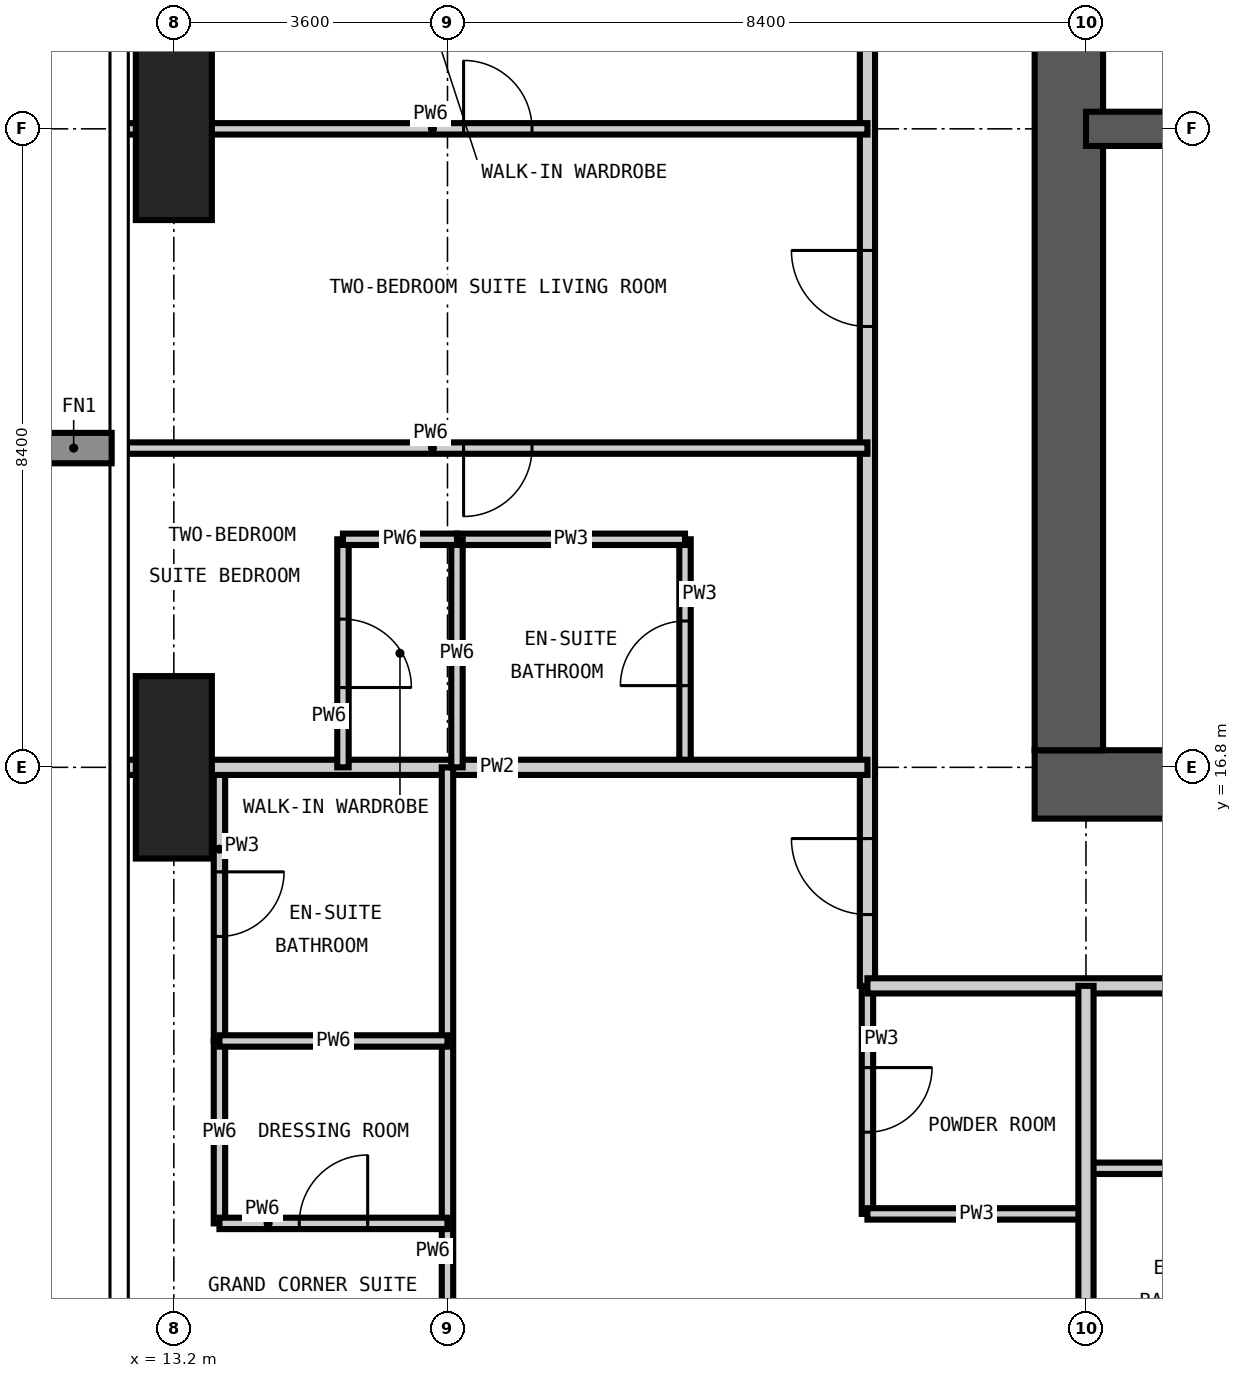
"""IFC4 building model, lengths in metres.
Left out: names, types, materials, properties, quantities, classifications, styles, units other than length and angle.
Written with IfcOpenShell. Run it as: python <this file> out.ifc"""

import sys

from ifc_helpers import new_model, si_unit, direction, frame, frame_2d, origin, origin_2d, place, context, subcontext, project, spatial, rectangle, extrude, element, fill, save


model = new_model("IFC4")
c1 = context("Model", 3, precision=1e-05, world=origin(), true_north=direction((0.0, 1.0)))
c2 = subcontext(c1, "Body", "Model", "MODEL_VIEW")
j1 = project(units=[si_unit("LENGTHUNIT", "METRE"), si_unit("PLANEANGLEUNIT", "RADIAN")], contexts=[c1])
p1 = place(None, origin())
s1 = spatial("IfcSite", under=j1, at=p1, CompositionType="ELEMENT")
p2 = place(p1, origin())
s2 = spatial("IfcBuilding", under=s1, at=p2, CompositionType="ELEMENT")
p3 = place(p2, frame((0.0, 0.0, 237.3)))
s3 = spatial("IfcBuildingStorey", under=s2, at=p3, CompositionType="ELEMENT", Elevation=237.3)
for number, where, z_axis, x_axis in (
    (1, (13.2, 16.8, -0.35), (0.0, 0.0, 1.0), (1.0, 0.0, 0.0)),
    (2, (13.2, 25.2, -0.35), (0.0, 0.0, 1.0), (1.0, 0.0, 0.0)),
):
    element("IfcColumn", number, at=place(p3, frame(where, z_axis=z_axis, x_axis=x_axis)), inside=s3, PredefinedType="COLUMN", context=c2, shape_type="SweptSolid", body=[
        extrude(rectangle(XDim=1.0, YDim=2.4, at=origin_2d()), origin(), (0.0, 0.0, 1.0), 3.9),
    ])
p4 = place(p3, frame((24.525, 16.575, -0.35), z_axis=(0.0, 0.0, 1.0), x_axis=(1.0, 0.0, 0.0)))
e3 = element("IfcWall", 3, at=p4, inside=s3, PredefinedType="SHEAR", context=c2, shape_type="SweptSolid", body=[
    extrude(rectangle(XDim=18.15, YDim=0.9, at=frame_2d((9.075, 0.0))), origin(), (0.0, 0.0, 1.0), 3.9),
])
p5 = place(p4, frame((4.375, 0.0, 0.35)))
e4 = element("IfcOpeningElement", 4, at=p5, cuts=e3, PredefinedType="OPENING", context=c2, shape_type="SweptSolid", body=[
    extrude(rectangle(XDim=1.0, YDim=2.1, at=frame_2d((0.5, 1.05))), frame((0.0, 0.46, 0.0), z_axis=(0.0, -1.0, 0.0), x_axis=(1.0, 0.0, 0.0)), (0.0, 0.0, 1.0), 0.92),
])
p6 = place(p4, frame((10.675, 0.0, 0.35)))
e5 = element("IfcOpeningElement", 5, at=p6, cuts=e3, PredefinedType="OPENING", context=c2, shape_type="SweptSolid", body=[
    extrude(rectangle(XDim=1.0, YDim=2.1, at=frame_2d((0.5, 1.05))), frame((0.0, 0.46, 0.0), z_axis=(0.0, -1.0, 0.0), x_axis=(1.0, 0.0, 0.0)), (0.0, 0.0, 1.0), 0.92),
])
p7 = place(p3, frame((24.975, 41.775, -0.35), z_axis=(0.0, 0.0, 1.0), x_axis=(0.0, -1.0, 0.0)))
e6 = element("IfcWall", 6, at=p7, inside=s3, PredefinedType="SHEAR", context=c2, shape_type="SweptSolid", body=[
    extrude(rectangle(XDim=24.75, YDim=0.9, at=frame_2d((12.375, 0.0))), origin(), (0.0, 0.0, 1.0), 3.9),
])
p8 = place(p7, frame((11.875, 0.0, 0.35)))
e7 = element("IfcOpeningElement", 7, at=p8, cuts=e6, PredefinedType="OPENING", context=c2, shape_type="SweptSolid", body=[
    extrude(rectangle(XDim=1.0, YDim=2.1, at=frame_2d((0.5, 1.05))), frame((0.0, 0.46, 0.0), z_axis=(0.0, -1.0, 0.0), x_axis=(1.0, 0.0, 0.0)), (0.0, 0.0, 1.0), 0.92),
])
p9 = place(p3, frame((25.2, 25.2, -0.35), z_axis=(0.0, 0.0, 1.0), x_axis=(1.0, 0.0, 0.0)))
e8 = element("IfcWall", 8, at=p9, inside=s3, PredefinedType="SHEAR", context=c2, shape_type="SweptSolid", body=[
    extrude(rectangle(XDim=16.8, YDim=0.45, at=frame_2d((8.4, 0.0))), origin(), (0.0, 0.0, 1.0), 3.9),
])
p10 = place(p3, frame((13.8, 13.2, 0.0), z_axis=(0.0, 0.0, 1.0), x_axis=(0.0, 1.0, 0.0)))
e9 = element("IfcWall", 9, at=p10, inside=s3, PredefinedType="PARTITIONING", context=c2, shape_type="SweptSolid", body=[
    extrude(rectangle(XDim=3.6, YDim=0.15, at=frame_2d((1.8, 0.0))), origin(), (0.0, 0.0, 1.0), 3.55),
])
p11 = place(p10, frame((1.375, 0.0, 0.0)))
e10 = element("IfcOpeningElement", 10, at=p11, cuts=e9, PredefinedType="OPENING", context=c2, shape_type="SweptSolid", body=[
    extrude(rectangle(XDim=0.85, YDim=2.1, at=frame_2d((0.425, 1.05))), frame((0.0, 0.085, 0.0), z_axis=(0.0, -1.0, 0.0), x_axis=(1.0, 0.0, 0.0)), (0.0, 0.0, 1.0), 0.17),
])
p12 = place(p3, frame((19.925, 16.8, 0.0), z_axis=(0.0, 0.0, 1.0), x_axis=(0.0, 1.0, 0.0)))
e11 = element("IfcWall", 11, at=p12, inside=s3, PredefinedType="PARTITIONING", context=c2, shape_type="SweptSolid", body=[
    extrude(rectangle(XDim=3.0, YDim=0.15, at=frame_2d((1.5, 0.0))), origin(), (0.0, 0.0, 1.0), 3.55),
])
p13 = place(p12, frame((1.075, 0.0, 0.0)))
e12 = element("IfcOpeningElement", 12, at=p13, cuts=e11, PredefinedType="OPENING", context=c2, shape_type="SweptSolid", body=[
    extrude(rectangle(XDim=0.85, YDim=2.1, at=frame_2d((0.425, 1.05))), frame((0.0, 0.085, 0.0), z_axis=(0.0, -1.0, 0.0), x_axis=(1.0, 0.0, 0.0)), (0.0, 0.0, 1.0), 0.17),
])
p14 = place(p3, frame((22.325, 10.925, 0.0), z_axis=(0.0, 0.0, 1.0), x_axis=(0.0, 1.0, 0.0)))
e13 = element("IfcWall", 13, at=p14, inside=s3, PredefinedType="PARTITIONING", context=c2, shape_type="SweptSolid", body=[
    extrude(rectangle(XDim=3.0, YDim=0.15, at=frame_2d((1.5, 0.0))), origin(), (0.0, 0.0, 1.0), 3.55),
])
p15 = place(p14, frame((1.075, 0.0, 0.0)))
e14 = element("IfcOpeningElement", 14, at=p15, cuts=e13, PredefinedType="OPENING", context=c2, shape_type="SweptSolid", body=[
    extrude(rectangle(XDim=0.85, YDim=2.1, at=frame_2d((0.425, 1.05))), frame((0.0, 0.085, 0.0), z_axis=(0.0, -1.0, 0.0), x_axis=(1.0, 0.0, 0.0)), (0.0, 0.0, 1.0), 0.17),
])
p16 = place(p3, frame((22.325, 10.925, 0.0), z_axis=(0.0, 0.0, 1.0), x_axis=(1.0, 0.0, 0.0)))
e15 = element("IfcWall", 15, at=p16, inside=s3, PredefinedType="PARTITIONING", context=c2, shape_type="SweptSolid", body=[
    extrude(rectangle(XDim=2.875, YDim=0.15, at=frame_2d((1.438, 0.0))), origin(), (0.0, 0.0, 1.0), 3.55),
])
for number, where, z_axis, x_axis in (
    (16, (25.2, 11.525, 0.0), (0.0, 0.0, 1.0), (1.0, 0.0, 0.0)),
    (17, (16.925, 19.8, 0.0), (0.0, 0.0, 1.0), (1.0, 0.0, 0.0)),
):
    element("IfcWall", number, at=place(p3, frame(where, z_axis=z_axis, x_axis=x_axis)), inside=s3, PredefinedType="PARTITIONING", context=c2, shape_type="SweptSolid", body=[
        extrude(rectangle(XDim=3.0, YDim=0.15, at=frame_2d((1.5, 0.0))), origin(), (0.0, 0.0, 1.0), 3.55),
    ])
p17 = place(p3, frame((22.325, 13.925, 0.0), z_axis=(0.0, 0.0, 1.0), x_axis=(0.0, 1.0, 0.0)))
e18 = element("IfcWall", 18, at=p17, inside=s3, PredefinedType="PARTITIONING", context=c2, shape_type="SweptSolid", body=[
    extrude(rectangle(XDim=30.65, YDim=0.2, at=frame_2d((15.325, 0.0))), origin(), (0.0, 0.0, 1.0), 3.55),
])
p18 = place(p17, frame((8.675, 0.0, 0.0)))
e19 = element("IfcOpeningElement", 19, at=p18, cuts=e18, PredefinedType="OPENING", context=c2, shape_type="SweptSolid", body=[
    extrude(rectangle(XDim=1.0, YDim=2.2, at=frame_2d((0.5, 1.1))), frame((0.0, 0.11, 0.0), z_axis=(0.0, -1.0, 0.0), x_axis=(1.0, 0.0, 0.0)), (0.0, 0.0, 1.0), 0.22),
])
p19 = place(p17, frame((21.275, 0.0, 0.0)))
e20 = element("IfcOpeningElement", 20, at=p19, cuts=e18, PredefinedType="OPENING", context=c2, shape_type="SweptSolid", body=[
    extrude(rectangle(XDim=1.0, YDim=2.2, at=frame_2d((0.5, 1.1))), frame((0.0, 0.11, 0.0), z_axis=(0.0, -1.0, 0.0), x_axis=(1.0, 0.0, 0.0)), (0.0, 0.0, 1.0), 0.22),
])
p20 = place(p17, frame((0.938, 0.0, 0.0)))
e21 = element("IfcOpeningElement", 21, at=p20, cuts=e18, PredefinedType="OPENING", context=c2, shape_type="SweptSolid", body=[
    extrude(rectangle(XDim=1.0, YDim=2.2, at=frame_2d((0.5, 1.1))), frame((0.0, 0.11, 0.0), z_axis=(0.0, -1.0, 0.0), x_axis=(1.0, 0.0, 0.0)), (0.0, 0.0, 1.0), 0.22),
])
p21 = place(p17, frame((28.863, 0.0, 0.0)))
e22 = element("IfcOpeningElement", 22, at=p21, cuts=e18, PredefinedType="OPENING", context=c2, shape_type="SweptSolid", body=[
    extrude(rectangle(XDim=1.0, YDim=2.2, at=frame_2d((0.5, 1.1))), frame((0.0, 0.11, 0.0), z_axis=(0.0, -1.0, 0.0), x_axis=(1.0, 0.0, 0.0)), (0.0, 0.0, 1.0), 0.22),
])
p22 = place(p3, frame((45.175, 13.925, 0.0), z_axis=(0.0, 0.0, 1.0), x_axis=(-1.0, 0.0, 0.0)))
e23 = element("IfcWall", 23, at=p22, inside=s3, PredefinedType="PARTITIONING", context=c2, shape_type="SweptSolid", body=[
    extrude(rectangle(XDim=22.85, YDim=0.2, at=frame_2d((11.425, 0.0))), origin(), (0.0, 0.0, 1.0), 3.55),
])
p23 = place(p22, frame((15.275, 0.0, 0.0)))
e24 = element("IfcOpeningElement", 24, at=p23, cuts=e23, PredefinedType="OPENING", context=c2, shape_type="SweptSolid", body=[
    extrude(rectangle(XDim=1.0, YDim=2.2, at=frame_2d((0.5, 1.1))), frame((0.0, 0.11, 0.0), z_axis=(0.0, -1.0, 0.0), x_axis=(1.0, 0.0, 0.0)), (0.0, 0.0, 1.0), 0.22),
])
p24 = place(p22, frame((6.875, 0.0, 0.0)))
e25 = element("IfcOpeningElement", 25, at=p24, cuts=e23, PredefinedType="OPENING", context=c2, shape_type="SweptSolid", body=[
    extrude(rectangle(XDim=1.0, YDim=2.2, at=frame_2d((0.5, 1.1))), frame((0.0, 0.11, 0.0), z_axis=(0.0, -1.0, 0.0), x_axis=(1.0, 0.0, 0.0)), (0.0, 0.0, 1.0), 0.22),
])
p25 = place(p3, frame((25.2, 4.182, 0.0), z_axis=(0.0, 0.0, 1.0), x_axis=(0.0, 1.0, 0.0)))
e26 = element("IfcWall", 26, at=p25, inside=s3, PredefinedType="PARTITIONING", context=c2, shape_type="SweptSolid", body=[
    extrude(rectangle(XDim=9.743, YDim=0.2, at=frame_2d((4.872, 0.0))), origin(), (0.0, 0.0, 1.0), 3.55),
])
p26 = place(p3, frame((12.582, 16.8, 0.0), z_axis=(0.0, 0.0, 1.0), x_axis=(1.0, 0.0, 0.0)))
e27 = element("IfcWall", 27, at=p26, inside=s3, PredefinedType="PARTITIONING", context=c2, shape_type="SweptSolid", body=[
    extrude(rectangle(XDim=9.743, YDim=0.2, at=frame_2d((4.872, 0.0))), origin(), (0.0, 0.0, 1.0), 3.55),
])
p27 = place(p3, frame((13.8, 10.8, 0.0), z_axis=(0.0, 0.0, 1.0), x_axis=(0.0, 1.0, 0.0)))
e28 = element("IfcWall", 28, at=p27, inside=s3, PredefinedType="PARTITIONING", context=c2, shape_type="SweptSolid", body=[
    extrude(rectangle(XDim=2.4, YDim=0.15, at=frame_2d((1.2, 0.0))), origin(), (0.0, 0.0, 1.0), 3.55),
])
p28 = place(p3, frame((15.425, 16.8, 0.0), z_axis=(0.0, 0.0, 1.0), x_axis=(0.0, 1.0, 0.0)))
e29 = element("IfcWall", 29, at=p28, inside=s3, PredefinedType="PARTITIONING", context=c2, shape_type="SweptSolid", body=[
    extrude(rectangle(XDim=3.0, YDim=0.15, at=frame_2d((1.5, 0.0))), origin(), (0.0, 0.0, 1.0), 3.55),
])
p29 = place(p28, frame((1.05, 0.0, 0.0)))
e30 = element("IfcOpeningElement", 30, at=p29, cuts=e29, PredefinedType="OPENING", context=c2, shape_type="SweptSolid", body=[
    extrude(rectangle(XDim=0.9, YDim=2.1, at=frame_2d((0.45, 1.05))), frame((0.0, 0.085, 0.0), z_axis=(0.0, -1.0, 0.0), x_axis=(1.0, 0.0, 0.0)), (0.0, 0.0, 1.0), 0.17),
])
p30 = place(p3, frame((16.8, 4.182, 0.0), z_axis=(0.0, 0.0, 1.0), x_axis=(0.0, 1.0, 0.0)))
e31 = element("IfcWall", 31, at=p30, inside=s3, PredefinedType="PARTITIONING", context=c2, shape_type="SweptSolid", body=[
    extrude(rectangle(XDim=12.618, YDim=0.15, at=frame_2d((6.309, 0.0))), origin(), (0.0, 0.0, 1.0), 3.55),
])
p31 = place(p30, frame((2.868, 0.0, 0.0)))
e32 = element("IfcOpeningElement", 32, at=p31, cuts=e31, PredefinedType="OPENING", context=c2, shape_type="SweptSolid", body=[
    extrude(rectangle(XDim=0.9, YDim=2.1, at=frame_2d((0.45, 1.05))), frame((0.0, 0.085, 0.0), z_axis=(0.0, -1.0, 0.0), x_axis=(1.0, 0.0, 0.0)), (0.0, 0.0, 1.0), 0.17),
])
p32 = place(p3, frame((16.925, 16.8, 0.0), z_axis=(0.0, 0.0, 1.0), x_axis=(0.0, 1.0, 0.0)))
e33 = element("IfcWall", 33, at=p32, inside=s3, PredefinedType="PARTITIONING", context=c2, shape_type="SweptSolid", body=[
    extrude(rectangle(XDim=3.0, YDim=0.15, at=frame_2d((1.5, 0.0))), origin(), (0.0, 0.0, 1.0), 3.55),
])
p33 = place(p3, frame((13.8, 10.8, 0.0), z_axis=(0.0, 0.0, 1.0), x_axis=(1.0, 0.0, 0.0)))
e34 = element("IfcWall", 34, at=p33, inside=s3, PredefinedType="PARTITIONING", context=c2, shape_type="SweptSolid", body=[
    extrude(rectangle(XDim=3.0, YDim=0.15, at=frame_2d((1.5, 0.0))), origin(), (0.0, 0.0, 1.0), 3.55),
])
p34 = place(p33, frame((1.05, 0.0, 0.0)))
e35 = element("IfcOpeningElement", 35, at=p34, cuts=e34, PredefinedType="OPENING", context=c2, shape_type="SweptSolid", body=[
    extrude(rectangle(XDim=0.9, YDim=2.1, at=frame_2d((0.45, 1.05))), frame((0.0, 0.085, 0.0), z_axis=(0.0, -1.0, 0.0), x_axis=(1.0, 0.0, 0.0)), (0.0, 0.0, 1.0), 0.17),
])
p35 = place(p3, frame((13.8, 13.2, 0.0), z_axis=(0.0, 0.0, 1.0), x_axis=(1.0, 0.0, 0.0)))
e36 = element("IfcWall", 36, at=p35, inside=s3, PredefinedType="PARTITIONING", context=c2, shape_type="SweptSolid", body=[
    extrude(rectangle(XDim=3.0, YDim=0.15, at=frame_2d((1.5, 0.0))), origin(), (0.0, 0.0, 1.0), 3.55),
])
p36 = place(p3, frame((15.425, 19.8, 0.0), z_axis=(0.0, 0.0, 1.0), x_axis=(1.0, 0.0, 0.0)))
e37 = element("IfcWall", 37, at=p36, inside=s3, PredefinedType="PARTITIONING", context=c2, shape_type="SweptSolid", body=[
    extrude(rectangle(XDim=1.5, YDim=0.15, at=frame_2d((0.75, 0.0))), origin(), (0.0, 0.0, 1.0), 3.55),
])
p37 = place(p3, frame((12.582, 21.0, 0.0), z_axis=(0.0, 0.0, 1.0), x_axis=(1.0, 0.0, 0.0)))
e38 = element("IfcWall", 38, at=p37, inside=s3, PredefinedType="PARTITIONING", context=c2, shape_type="SweptSolid", body=[
    extrude(rectangle(XDim=9.743, YDim=0.15, at=frame_2d((4.872, 0.0))), origin(), (0.0, 0.0, 1.0), 3.55),
])
p38 = place(p37, frame((4.43, 0.0, 0.0)))
e39 = element("IfcOpeningElement", 39, at=p38, cuts=e38, PredefinedType="OPENING", context=c2, shape_type="SweptSolid", body=[
    extrude(rectangle(XDim=0.9, YDim=2.1, at=frame_2d((0.45, 1.05))), frame((0.0, 0.085, 0.0), z_axis=(0.0, -1.0, 0.0), x_axis=(1.0, 0.0, 0.0)), (0.0, 0.0, 1.0), 0.17),
])
p39 = place(p3, frame((12.582, 25.2, 0.0), z_axis=(0.0, 0.0, 1.0), x_axis=(1.0, 0.0, 0.0)))
e40 = element("IfcWall", 40, at=p39, inside=s3, PredefinedType="PARTITIONING", context=c2, shape_type="SweptSolid", body=[
    extrude(rectangle(XDim=9.743, YDim=0.15, at=frame_2d((4.872, 0.0))), origin(), (0.0, 0.0, 1.0), 3.55),
])
p40 = place(p39, frame((4.43, 0.0, 0.0)))
e41 = element("IfcOpeningElement", 41, at=p40, cuts=e40, PredefinedType="OPENING", context=c2, shape_type="SweptSolid", body=[
    extrude(rectangle(XDim=0.9, YDim=2.1, at=frame_2d((0.45, 1.05))), frame((0.0, 0.085, 0.0), z_axis=(0.0, -1.0, 0.0), x_axis=(1.0, 0.0, 0.0)), (0.0, 0.0, 1.0), 0.17),
])
p41 = place(p18, origin())
e42 = element("IfcDoor", 42, at=p41, inside=s3, OperationType="SINGLE_SWING_RIGHT", PredefinedType="DOOR", context=c2, shape_type="SweptSolid", body=[
    extrude(rectangle(XDim=1.0, YDim=2.2, at=frame_2d((0.5, 1.1))), frame((0.0, 0.025, 0.0), z_axis=(0.0, -1.0, 0.0), x_axis=(1.0, 0.0, 0.0)), (0.0, 0.0, 1.0), 0.05),
])
fill(e19, e42)
p42 = place(p38, frame((0.9, 0.0, 0.0), z_axis=(0.0, 0.0, 1.0), x_axis=(-1.0, 0.0, 0.0)))
e43 = element("IfcDoor", 43, at=p42, inside=s3, OperationType="SINGLE_SWING_RIGHT", PredefinedType="DOOR", context=c2, shape_type="SweptSolid", body=[
    extrude(rectangle(XDim=0.9, YDim=2.1, at=frame_2d((0.45, 1.05))), frame((0.0, 0.025, 0.0), z_axis=(0.0, -1.0, 0.0), x_axis=(1.0, 0.0, 0.0)), (0.0, 0.0, 1.0), 0.05),
])
fill(e39, e43)
p43 = place(p13, origin())
e44 = element("IfcDoor", 44, at=p43, inside=s3, OperationType="SINGLE_SWING_LEFT", PredefinedType="DOOR", context=c2, shape_type="SweptSolid", body=[
    extrude(rectangle(XDim=0.85, YDim=2.1, at=frame_2d((0.425, 1.05))), frame((0.0, 0.025, 0.0), z_axis=(0.0, -1.0, 0.0), x_axis=(1.0, 0.0, 0.0)), (0.0, 0.0, 1.0), 0.05),
])
fill(e12, e44)
p44 = place(p29, frame((0.9, 0.0, 0.0), z_axis=(0.0, 0.0, 1.0), x_axis=(-1.0, 0.0, 0.0)))
e45 = element("IfcDoor", 45, at=p44, inside=s3, OperationType="SINGLE_SWING_RIGHT", PredefinedType="DOOR", context=c2, shape_type="SweptSolid", body=[
    extrude(rectangle(XDim=0.9, YDim=2.1, at=frame_2d((0.45, 1.05))), frame((0.0, 0.025, 0.0), z_axis=(0.0, -1.0, 0.0), x_axis=(1.0, 0.0, 0.0)), (0.0, 0.0, 1.0), 0.05),
])
fill(e30, e45)
p45 = place(p40, origin())
e46 = element("IfcDoor", 46, at=p45, inside=s3, OperationType="SINGLE_SWING_LEFT", PredefinedType="DOOR", context=c2, shape_type="SweptSolid", body=[
    extrude(rectangle(XDim=0.9, YDim=2.1, at=frame_2d((0.45, 1.05))), frame((0.0, 0.025, 0.0), z_axis=(0.0, -1.0, 0.0), x_axis=(1.0, 0.0, 0.0)), (0.0, 0.0, 1.0), 0.05),
])
fill(e41, e46)
p46 = place(p20, origin())
e47 = element("IfcDoor", 47, at=p46, inside=s3, OperationType="SINGLE_SWING_RIGHT", PredefinedType="DOOR", context=c2, shape_type="SweptSolid", body=[
    extrude(rectangle(XDim=1.0, YDim=2.2, at=frame_2d((0.5, 1.1))), frame((0.0, 0.025, 0.0), z_axis=(0.0, -1.0, 0.0), x_axis=(1.0, 0.0, 0.0)), (0.0, 0.0, 1.0), 0.05),
])
fill(e21, e47)
p47 = place(p15, frame((0.85, 0.0, 0.0), z_axis=(0.0, 0.0, 1.0), x_axis=(-1.0, 0.0, 0.0)))
e48 = element("IfcDoor", 48, at=p47, inside=s3, OperationType="SINGLE_SWING_LEFT", PredefinedType="DOOR", context=c2, shape_type="SweptSolid", body=[
    extrude(rectangle(XDim=0.85, YDim=2.1, at=frame_2d((0.425, 1.05))), frame((0.0, 0.025, 0.0), z_axis=(0.0, -1.0, 0.0), x_axis=(1.0, 0.0, 0.0)), (0.0, 0.0, 1.0), 0.05),
])
fill(e14, e48)
p48 = place(p11, frame((0.85, 0.0, 0.0), z_axis=(0.0, 0.0, 1.0), x_axis=(-1.0, 0.0, 0.0)))
e49 = element("IfcDoor", 49, at=p48, inside=s3, OperationType="SINGLE_SWING_LEFT", PredefinedType="DOOR", context=c2, shape_type="SweptSolid", body=[
    extrude(rectangle(XDim=0.85, YDim=2.1, at=frame_2d((0.425, 1.05))), frame((0.0, 0.025, 0.0), z_axis=(0.0, -1.0, 0.0), x_axis=(1.0, 0.0, 0.0)), (0.0, 0.0, 1.0), 0.05),
])
fill(e10, e49)
p49 = place(p34, origin())
e50 = element("IfcDoor", 50, at=p49, inside=s3, OperationType="SINGLE_SWING_RIGHT", PredefinedType="DOOR", context=c2, shape_type="SweptSolid", body=[
    extrude(rectangle(XDim=0.9, YDim=2.1, at=frame_2d((0.45, 1.05))), frame((0.0, 0.025, 0.0), z_axis=(0.0, -1.0, 0.0), x_axis=(1.0, 0.0, 0.0)), (0.0, 0.0, 1.0), 0.05),
])
fill(e35, e50)
save(model, sys.argv[1])
